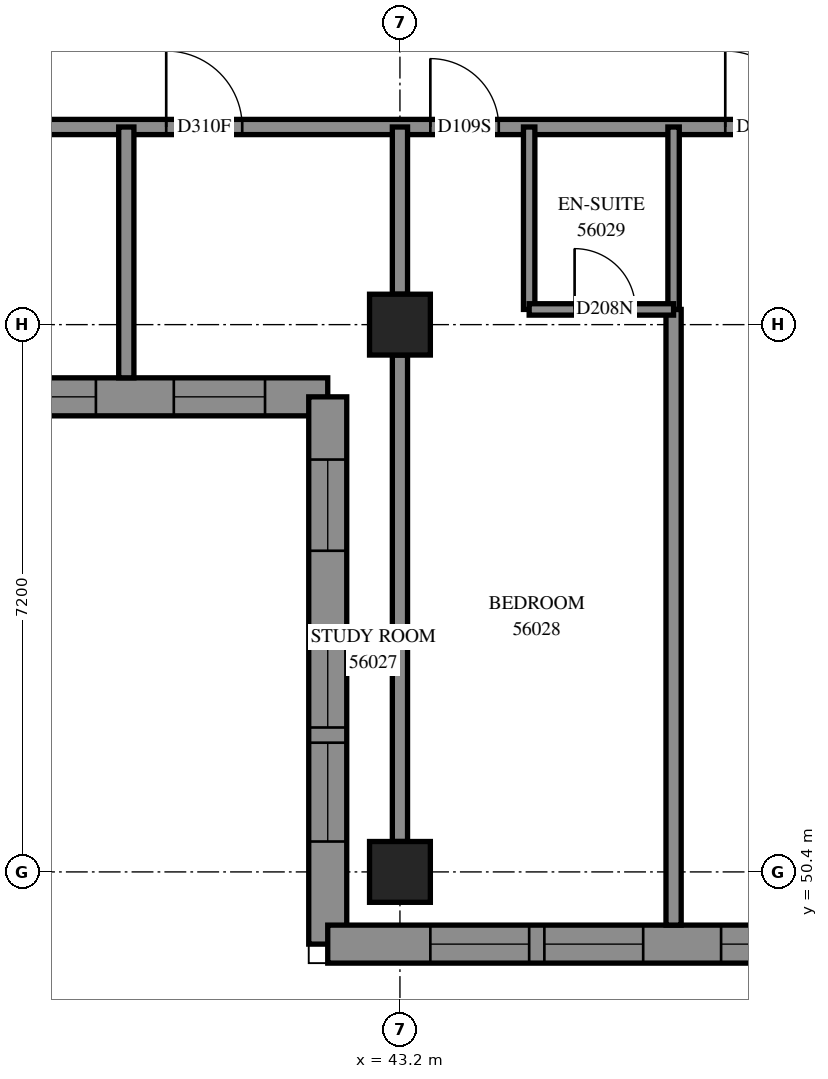
"""IFC4 building model, lengths in metres.
Left out: names, types, materials, properties, quantities, classifications, styles, units other than length and angle.
Written with IfcOpenShell. Run it as: python <this file> out.ifc"""

import sys

from ifc_helpers import new_model, si_unit, direction, frame, frame_2d, origin, origin_2d, place, context, subcontext, project, spatial, polyline, rectangle, outline, extrude, element, fill, save


model = new_model("IFC4")
c1 = context("Model", 3, precision=1e-05, world=origin(), true_north=direction((0.0, 1.0)))
c2 = subcontext(c1, "Body", "Model", "MODEL_VIEW")
j1 = project(units=[si_unit("LENGTHUNIT", "METRE"), si_unit("PLANEANGLEUNIT", "RADIAN")], contexts=[c1])
p1 = place(None, origin())
s1 = spatial("IfcSite", under=j1, at=p1, CompositionType="ELEMENT")
p2 = place(p1, origin())
s2 = spatial("IfcBuilding", under=s1, at=p2, CompositionType="ELEMENT")
p3 = place(p2, frame((0.0, 0.0, 206.6)))
s3 = spatial("IfcBuildingStorey", under=s2, at=p3, CompositionType="ELEMENT", Elevation=206.6)
for number, where, z_axis, x_axis in (
    (1, (43.2, 50.4, 0.0), (0.0, 0.0, 1.0), (1.0, 0.0, 0.0)),
    (2, (43.2, 57.6, 0.0), (0.0, 0.0, 1.0), (1.0, 0.0, 0.0)),
):
    element("IfcColumn", number, at=place(p3, frame(where, z_axis=z_axis, x_axis=x_axis)), inside=s3, PredefinedType="COLUMN", context=c2, shape_type="SweptSolid", body=[
        extrude(rectangle(XDim=0.8, YDim=0.8, at=origin_2d()), origin(), (0.0, 0.0, 1.0), 3.1),
    ])
p4 = place(p3, frame((35.05, 56.65, 0.0), z_axis=(0.0, 0.0, 1.0), x_axis=(1.0, 0.0, 0.0)))
e3 = element("IfcWall", 3, at=p4, inside=s3, PredefinedType="SOLIDWALL", context=c2, shape_type="SweptSolid", body=[
    extrude(outline(polyline([(-0.25, -0.25), (6.95, -0.25), (7.45, 0.25), (0.25, 0.25), (-0.25, -0.25)])), origin(), (0.0, 0.0, 1.0), 3.1),
])
p5 = place(p4, frame((1.35, 0.0, 0.45)))
e4 = element("IfcOpeningElement", 4, at=p5, cuts=e3, PredefinedType="OPENING", context=c2, shape_type="SweptSolid", body=[
    extrude(rectangle(XDim=1.3, YDim=2.5, at=frame_2d((0.65, 1.25))), frame((0.0, 0.26, 0.0), z_axis=(0.0, -1.0, 0.0), x_axis=(1.0, 0.0, 0.0)), (0.0, 0.0, 1.0), 0.52),
])
p6 = place(p4, frame((2.85, 0.0, 0.45)))
e5 = element("IfcOpeningElement", 5, at=p6, cuts=e3, PredefinedType="OPENING", context=c2, shape_type="SweptSolid", body=[
    extrude(rectangle(XDim=1.3, YDim=2.5, at=frame_2d((0.65, 1.25))), frame((0.0, 0.26, 0.0), z_axis=(0.0, -1.0, 0.0), x_axis=(1.0, 0.0, 0.0)), (0.0, 0.0, 1.0), 0.52),
])
p7 = place(p4, frame((5.175, 0.0, 0.45)))
e6 = element("IfcOpeningElement", 6, at=p7, cuts=e3, PredefinedType="OPENING", context=c2, shape_type="SweptSolid", body=[
    extrude(rectangle(XDim=1.2, YDim=2.5, at=frame_2d((0.6, 1.25))), frame((0.0, 0.26, 0.0), z_axis=(0.0, -1.0, 0.0), x_axis=(1.0, 0.0, 0.0)), (0.0, 0.0, 1.0), 0.52),
])
p8 = place(p3, frame((42.25, 56.65, 0.0), z_axis=(0.0, 0.0, 1.0), x_axis=(0.0, -1.0, 0.0)))
e7 = element("IfcWall", 7, at=p8, inside=s3, PredefinedType="SOLIDWALL", context=c2, shape_type="SweptSolid", body=[
    extrude(outline(polyline([(0.25, -0.25), (7.45, -0.25), (6.95, 0.25), (-0.25, 0.25), (0.25, -0.25)])), origin(), (0.0, 0.0, 1.0), 3.1),
])
p9 = place(p8, frame((3.05, 0.0, 0.45)))
e8 = element("IfcOpeningElement", 8, at=p9, cuts=e7, PredefinedType="OPENING", context=c2, shape_type="SweptSolid", body=[
    extrude(rectangle(XDim=1.3, YDim=2.5, at=frame_2d((0.65, 1.25))), frame((0.0, 0.26, 0.0), z_axis=(0.0, -1.0, 0.0), x_axis=(1.0, 0.0, 0.0)), (0.0, 0.0, 1.0), 0.52),
])
p10 = place(p8, frame((4.55, 0.0, 0.45)))
e9 = element("IfcOpeningElement", 9, at=p10, cuts=e7, PredefinedType="OPENING", context=c2, shape_type="SweptSolid", body=[
    extrude(rectangle(XDim=1.3, YDim=2.5, at=frame_2d((0.65, 1.25))), frame((0.0, 0.26, 0.0), z_axis=(0.0, -1.0, 0.0), x_axis=(1.0, 0.0, 0.0)), (0.0, 0.0, 1.0), 0.52),
])
p11 = place(p8, frame((0.825, 0.0, 0.45)))
e10 = element("IfcOpeningElement", 10, at=p11, cuts=e7, PredefinedType="OPENING", context=c2, shape_type="SweptSolid", body=[
    extrude(rectangle(XDim=1.2, YDim=2.5, at=frame_2d((0.6, 1.25))), frame((0.0, 0.26, 0.0), z_axis=(0.0, -1.0, 0.0), x_axis=(1.0, 0.0, 0.0)), (0.0, 0.0, 1.0), 0.52),
])
p12 = place(p3, frame((42.25, 49.45, 0.0), z_axis=(0.0, 0.0, 1.0), x_axis=(1.0, 0.0, 0.0)))
e11 = element("IfcWall", 11, at=p12, inside=s3, PredefinedType="SOLIDWALL", context=c2, shape_type="SweptSolid", body=[
    extrude(outline(polyline([(-0.25, -0.25), (6.95, -0.25), (7.45, 0.25), (0.25, 0.25), (-0.25, -0.25)])), origin(), (0.0, 0.0, 1.0), 3.1),
])
p13 = place(p12, frame((1.35, 0.0, 0.45)))
e12 = element("IfcOpeningElement", 12, at=p13, cuts=e11, PredefinedType="OPENING", context=c2, shape_type="SweptSolid", body=[
    extrude(rectangle(XDim=1.3, YDim=2.5, at=frame_2d((0.65, 1.25))), frame((0.0, 0.26, 0.0), z_axis=(0.0, -1.0, 0.0), x_axis=(1.0, 0.0, 0.0)), (0.0, 0.0, 1.0), 0.52),
])
p14 = place(p12, frame((2.85, 0.0, 0.45)))
e13 = element("IfcOpeningElement", 13, at=p14, cuts=e11, PredefinedType="OPENING", context=c2, shape_type="SweptSolid", body=[
    extrude(rectangle(XDim=1.3, YDim=2.5, at=frame_2d((0.65, 1.25))), frame((0.0, 0.26, 0.0), z_axis=(0.0, -1.0, 0.0), x_axis=(1.0, 0.0, 0.0)), (0.0, 0.0, 1.0), 0.52),
])
p15 = place(p12, frame((5.175, 0.0, 0.45)))
e14 = element("IfcOpeningElement", 14, at=p15, cuts=e11, PredefinedType="OPENING", context=c2, shape_type="SweptSolid", body=[
    extrude(rectangle(XDim=1.2, YDim=2.5, at=frame_2d((0.6, 1.25))), frame((0.0, 0.26, 0.0), z_axis=(0.0, -1.0, 0.0), x_axis=(1.0, 0.0, 0.0)), (0.0, 0.0, 1.0), 0.52),
])
p16 = place(p3, frame((36.0, 60.2, 0.0), z_axis=(0.0, 0.0, 1.0), x_axis=(1.0, 0.0, 0.0)))
e15 = element("IfcWall", 15, at=p16, inside=s3, PredefinedType="PARTITIONING", context=c2, shape_type="SweptSolid", body=[
    extrude(rectangle(XDim=17.0, YDim=0.2, at=frame_2d((8.5, 0.0))), origin(), (0.0, 0.0, 1.0), 3.1),
])
p17 = place(p16, frame((4.125, 0.0, 0.0)))
e16 = element("IfcOpeningElement", 16, at=p17, cuts=e15, PredefinedType="OPENING", context=c2, shape_type="SweptSolid", body=[
    extrude(rectangle(XDim=1.0, YDim=2.1, at=frame_2d((0.5, 1.05))), frame((0.0, 0.11, 0.0), z_axis=(0.0, -1.0, 0.0), x_axis=(1.0, 0.0, 0.0)), (0.0, 0.0, 1.0), 0.22),
])
p18 = place(p16, frame((7.6, 0.0, 0.0)))
e17 = element("IfcOpeningElement", 17, at=p18, cuts=e15, PredefinedType="OPENING", context=c2, shape_type="SweptSolid", body=[
    extrude(rectangle(XDim=0.9, YDim=2.1, at=frame_2d((0.45, 1.05))), frame((0.0, 0.11, 0.0), z_axis=(0.0, -1.0, 0.0), x_axis=(1.0, 0.0, 0.0)), (0.0, 0.0, 1.0), 0.22),
])
p19 = place(p16, frame((11.48, 0.0, 0.0)))
e18 = element("IfcOpeningElement", 18, at=p19, cuts=e15, PredefinedType="OPENING", context=c2, shape_type="SweptSolid", body=[
    extrude(rectangle(XDim=1.0, YDim=2.1, at=frame_2d((0.5, 1.05))), frame((0.0, 0.11, 0.0), z_axis=(0.0, -1.0, 0.0), x_axis=(1.0, 0.0, 0.0)), (0.0, 0.0, 1.0), 0.22),
])
p20 = place(p16, frame((15.805, 0.0, 0.0)))
e19 = element("IfcOpeningElement", 19, at=p20, cuts=e15, PredefinedType="OPENING", context=c2, shape_type="SweptSolid", body=[
    extrude(rectangle(XDim=1.0, YDim=2.1, at=frame_2d((0.5, 1.05))), frame((0.0, 0.11, 0.0), z_axis=(0.0, -1.0, 0.0), x_axis=(1.0, 0.0, 0.0)), (0.0, 0.0, 1.0), 0.22),
])
p21 = place(p3, frame((46.8, 49.7, 0.0), z_axis=(0.0, 0.0, 1.0), x_axis=(0.0, 1.0, 0.0)))
e20 = element("IfcWall", 20, at=p21, inside=s3, PredefinedType="PARTITIONING", context=c2, shape_type="SweptSolid", body=[
    extrude(rectangle(XDim=8.1, YDim=0.2, at=frame_2d((4.05, 0.0))), origin(), (0.0, 0.0, 1.0), 3.1),
])
p22 = place(p3, frame((43.2, 50.8, 0.0), z_axis=(0.0, 0.0, 1.0), x_axis=(0.0, 1.0, 0.0)))
e21 = element("IfcWall", 21, at=p22, inside=s3, PredefinedType="PARTITIONING", context=c2, shape_type="SweptSolid", body=[
    extrude(rectangle(XDim=6.4, YDim=0.2, at=frame_2d((3.2, 0.0))), origin(), (0.0, 0.0, 1.0), 2.6),
])
p23 = place(p3, frame((39.6, 56.9, 0.0), z_axis=(0.0, 0.0, 1.0), x_axis=(0.0, 1.0, 0.0)))
e22 = element("IfcWall", 22, at=p23, inside=s3, PredefinedType="PARTITIONING", context=c2, shape_type="SweptSolid", body=[
    extrude(rectangle(XDim=3.3, YDim=0.2, at=frame_2d((1.65, 0.0))), origin(), (0.0, 0.0, 1.0), 3.1),
])
for number, where, z_axis, x_axis in (
    (23, (44.9, 57.8, 0.0), (0.0, 0.0, 1.0), (0.0, 1.0, 0.0)),
    (24, (46.8, 57.8, 0.0), (0.0, 0.0, 1.0), (0.0, 1.0, 0.0)),
):
    element("IfcWall", number, at=place(p3, frame(where, z_axis=z_axis, x_axis=x_axis)), inside=s3, PredefinedType="PARTITIONING", context=c2, shape_type="SweptSolid", body=[
        extrude(rectangle(XDim=2.4, YDim=0.15, at=frame_2d((1.2, 0.0))), origin(), (0.0, 0.0, 1.0), 3.1),
    ])
p24 = place(p3, frame((43.2, 58.0, 0.0), z_axis=(0.0, 0.0, 1.0), x_axis=(0.0, 1.0, 0.0)))
e25 = element("IfcWall", 25, at=p24, inside=s3, PredefinedType="PARTITIONING", context=c2, shape_type="SweptSolid", body=[
    extrude(rectangle(XDim=2.2, YDim=0.2, at=frame_2d((1.1, 0.0))), origin(), (0.0, 0.0, 1.0), 3.1),
])
p25 = place(p3, frame((44.9, 57.8, 0.0), z_axis=(0.0, 0.0, 1.0), x_axis=(1.0, 0.0, 0.0)))
e26 = element("IfcWall", 26, at=p25, inside=s3, PredefinedType="PARTITIONING", context=c2, shape_type="SweptSolid", body=[
    extrude(rectangle(XDim=1.9, YDim=0.15, at=frame_2d((0.95, 0.0))), origin(), (0.0, 0.0, 1.0), 3.1),
])
p26 = place(p25, frame((0.598, 0.0, 0.0)))
e27 = element("IfcOpeningElement", 27, at=p26, cuts=e26, PredefinedType="OPENING", context=c2, shape_type="SweptSolid", body=[
    extrude(rectangle(XDim=0.8, YDim=2.1, at=frame_2d((0.4, 1.05))), frame((0.0, 0.085, 0.0), z_axis=(0.0, -1.0, 0.0), x_axis=(1.0, 0.0, 0.0)), (0.0, 0.0, 1.0), 0.17),
])
p27 = place(p6, origin())
e28 = element("IfcWindow", 28, at=p27, inside=s3, PartitioningType="SINGLE_PANEL", PredefinedType="WINDOW", context=c2, shape_type="SweptSolid", body=[
    extrude(rectangle(XDim=1.3, YDim=2.5, at=frame_2d((0.65, 1.25))), frame((0.0, 0.18, 0.0), z_axis=(0.0, -1.0, 0.0), x_axis=(1.0, 0.0, 0.0)), (0.0, 0.0, 1.0), 0.06),
])
fill(e5, e28)
p28 = place(p7, origin())
e29 = element("IfcWindow", 29, at=p28, inside=s3, PartitioningType="SINGLE_PANEL", PredefinedType="WINDOW", context=c2, shape_type="SweptSolid", body=[
    extrude(rectangle(XDim=1.2, YDim=2.5, at=frame_2d((0.6, 1.25))), frame((0.0, 0.18, 0.0), z_axis=(0.0, -1.0, 0.0), x_axis=(1.0, 0.0, 0.0)), (0.0, 0.0, 1.0), 0.06),
])
fill(e6, e29)
p29 = place(p9, origin())
e30 = element("IfcWindow", 30, at=p29, inside=s3, PartitioningType="SINGLE_PANEL", PredefinedType="WINDOW", context=c2, shape_type="SweptSolid", body=[
    extrude(rectangle(XDim=1.3, YDim=2.5, at=frame_2d((0.65, 1.25))), frame((0.0, 0.18, 0.0), z_axis=(0.0, -1.0, 0.0), x_axis=(1.0, 0.0, 0.0)), (0.0, 0.0, 1.0), 0.06),
])
fill(e8, e30)
p30 = place(p10, origin())
e31 = element("IfcWindow", 31, at=p30, inside=s3, PartitioningType="SINGLE_PANEL", PredefinedType="WINDOW", context=c2, shape_type="SweptSolid", body=[
    extrude(rectangle(XDim=1.3, YDim=2.5, at=frame_2d((0.65, 1.25))), frame((0.0, 0.18, 0.0), z_axis=(0.0, -1.0, 0.0), x_axis=(1.0, 0.0, 0.0)), (0.0, 0.0, 1.0), 0.06),
])
fill(e9, e31)
p31 = place(p11, origin())
e32 = element("IfcWindow", 32, at=p31, inside=s3, PartitioningType="SINGLE_PANEL", PredefinedType="WINDOW", context=c2, shape_type="SweptSolid", body=[
    extrude(rectangle(XDim=1.2, YDim=2.5, at=frame_2d((0.6, 1.25))), frame((0.0, 0.18, 0.0), z_axis=(0.0, -1.0, 0.0), x_axis=(1.0, 0.0, 0.0)), (0.0, 0.0, 1.0), 0.06),
])
fill(e10, e32)
p32 = place(p13, origin())
e33 = element("IfcWindow", 33, at=p32, inside=s3, PartitioningType="SINGLE_PANEL", PredefinedType="WINDOW", context=c2, shape_type="SweptSolid", body=[
    extrude(rectangle(XDim=1.3, YDim=2.5, at=frame_2d((0.65, 1.25))), frame((0.0, 0.18, 0.0), z_axis=(0.0, -1.0, 0.0), x_axis=(1.0, 0.0, 0.0)), (0.0, 0.0, 1.0), 0.06),
])
fill(e12, e33)
p33 = place(p14, origin())
e34 = element("IfcWindow", 34, at=p33, inside=s3, PartitioningType="SINGLE_PANEL", PredefinedType="WINDOW", context=c2, shape_type="SweptSolid", body=[
    extrude(rectangle(XDim=1.3, YDim=2.5, at=frame_2d((0.65, 1.25))), frame((0.0, 0.18, 0.0), z_axis=(0.0, -1.0, 0.0), x_axis=(1.0, 0.0, 0.0)), (0.0, 0.0, 1.0), 0.06),
])
fill(e13, e34)
p34 = place(p15, origin())
e35 = element("IfcWindow", 35, at=p34, inside=s3, PartitioningType="SINGLE_PANEL", PredefinedType="WINDOW", context=c2, shape_type="SweptSolid", body=[
    extrude(rectangle(XDim=1.2, YDim=2.5, at=frame_2d((0.6, 1.25))), frame((0.0, 0.18, 0.0), z_axis=(0.0, -1.0, 0.0), x_axis=(1.0, 0.0, 0.0)), (0.0, 0.0, 1.0), 0.06),
])
fill(e14, e35)
p35 = place(p17, origin())
e36 = element("IfcDoor", 36, at=p35, inside=s3, OperationType="SINGLE_SWING_RIGHT", PredefinedType="DOOR", context=c2, shape_type="SweptSolid", body=[
    extrude(rectangle(XDim=1.0, YDim=2.1, at=frame_2d((0.5, 1.05))), frame((0.0, 0.025, 0.0), z_axis=(0.0, -1.0, 0.0), x_axis=(1.0, 0.0, 0.0)), (0.0, 0.0, 1.0), 0.05),
])
fill(e16, e36)
p36 = place(p18, origin())
e37 = element("IfcDoor", 37, at=p36, inside=s3, OperationType="SINGLE_SWING_LEFT", PredefinedType="DOOR", context=c2, shape_type="SweptSolid", body=[
    extrude(rectangle(XDim=0.9, YDim=2.1, at=frame_2d((0.45, 1.05))), frame((0.0, 0.025, 0.0), z_axis=(0.0, -1.0, 0.0), x_axis=(1.0, 0.0, 0.0)), (0.0, 0.0, 1.0), 0.05),
])
fill(e17, e37)
p37 = place(p26, origin())
e38 = element("IfcDoor", 38, at=p37, inside=s3, OperationType="SINGLE_SWING_RIGHT", PredefinedType="DOOR", context=c2, shape_type="SweptSolid", body=[
    extrude(rectangle(XDim=0.8, YDim=2.1, at=frame_2d((0.4, 1.05))), frame((0.0, 0.025, 0.0), z_axis=(0.0, -1.0, 0.0), x_axis=(1.0, 0.0, 0.0)), (0.0, 0.0, 1.0), 0.05),
])
fill(e27, e38)
p38 = place(p19, origin())
e39 = element("IfcDoor", 39, at=p38, inside=s3, OperationType="SINGLE_SWING_RIGHT", PredefinedType="DOOR", context=c2, shape_type="SweptSolid", body=[
    extrude(rectangle(XDim=1.0, YDim=2.1, at=frame_2d((0.5, 1.05))), frame((0.0, 0.025, 0.0), z_axis=(0.0, -1.0, 0.0), x_axis=(1.0, 0.0, 0.0)), (0.0, 0.0, 1.0), 0.05),
])
fill(e18, e39)
save(model, sys.argv[1])
